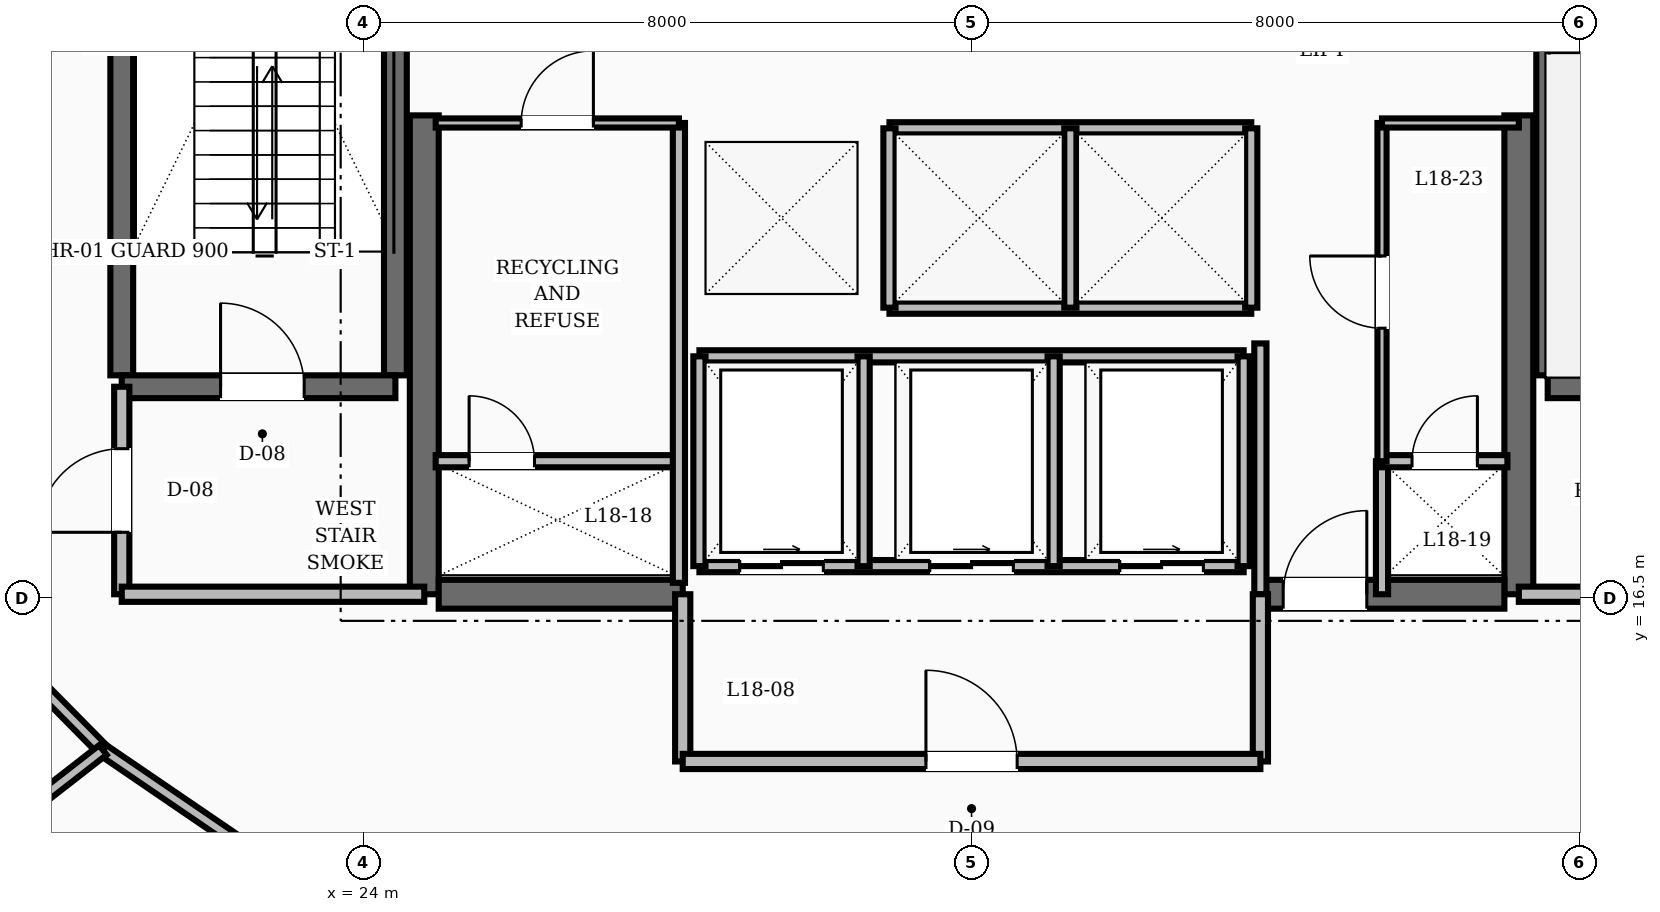
"""IFC4 building model, lengths in metres.
Left out: names, types, materials, properties, quantities, classifications, styles, units other than length and angle.
Written with IfcOpenShell. Run it as: python <this file> out.ifc"""

import sys

from ifc_helpers import new_model, si_unit, direction, frame, frame_2d, origin, place, context, subcontext, project, spatial, rectangle, extrude, element, fill, save


model = new_model("IFC4")
c1 = context("Model", 3, precision=1e-05, world=origin(), true_north=direction((0.0, 1.0)))
c2 = subcontext(c1, "Body", "Model", "MODEL_VIEW")
j1 = project(units=[si_unit("LENGTHUNIT", "METRE"), si_unit("PLANEANGLEUNIT", "RADIAN")], contexts=[c1])
p1 = place(None, origin())
s1 = spatial("IfcSite", under=j1, at=p1, CompositionType="ELEMENT")
p2 = place(p1, origin())
s2 = spatial("IfcBuilding", under=s1, at=p2, CompositionType="ELEMENT")
p3 = place(p2, frame((0.0, 0.0, 73.6)))
s3 = spatial("IfcBuildingStorey", under=s2, at=p3, CompositionType="ELEMENT", Elevation=73.6)
for number, where, z_axis, x_axis in (
    (1, (24.8, 16.55, 0.0), (0.0, 0.0, 1.0), (0.0, 1.0, 0.0)),
    (2, (39.2, 16.55, 0.0), (0.0, 0.0, 1.0), (0.0, 1.0, 0.0)),
):
    element("IfcWall", number, at=place(p3, frame(where, z_axis=z_axis, x_axis=x_axis)), inside=s3, PredefinedType="SHEAR", context=c2, shape_type="SweptSolid", body=[
        extrude(rectangle(XDim=6.3, YDim=0.38, at=frame_2d((3.15, 0.0))), origin(), (0.0, 0.0, 1.0), 3.6),
    ])
p4 = place(p3, frame((24.99, 16.55, 0.0), z_axis=(0.0, 0.0, 1.0), x_axis=(1.0, 0.0, 0.0)))
e3 = element("IfcWall", 3, at=p4, inside=s3, PredefinedType="SHEAR", context=c2, shape_type="SweptSolid", body=[
    extrude(rectangle(XDim=3.21, YDim=0.38, at=frame_2d((1.605, 0.0))), origin(), (0.0, 0.0, 1.0), 3.6),
])
p5 = place(p3, frame((35.8, 16.55, 0.0), z_axis=(0.0, 0.0, 1.0), x_axis=(1.0, 0.0, 0.0)))
e4 = element("IfcWall", 4, at=p5, inside=s3, PredefinedType="SHEAR", context=c2, shape_type="SweptSolid", body=[
    extrude(rectangle(XDim=3.21, YDim=0.38, at=frame_2d((1.605, 0.0))), origin(), (0.0, 0.0, 1.0), 3.6),
])
p6 = place(p5, frame((0.3, 0.0, 0.0)))
e5 = element("IfcOpeningElement", 5, at=p6, cuts=e4, PredefinedType="OPENING", context=c2, shape_type="SweptSolid", body=[
    extrude(rectangle(XDim=1.1, YDim=2.1, at=frame_2d((0.55, 1.05))), frame((0.0, 0.2, 0.0), z_axis=(0.0, -1.0, 0.0), x_axis=(1.0, 0.0, 0.0)), (0.0, 0.0, 1.0), 0.4),
])
for number, where, z_axis, x_axis in (
    (6, (20.82, 19.43, 0.0), (0.0, 0.0, 1.0), (0.0, 1.0, 0.0)),
    (7, (24.42, 19.43, 0.0), (0.0, 0.0, 1.0), (0.0, 1.0, 0.0)),
):
    element("IfcWall", number, at=place(p3, frame(where, z_axis=z_axis, x_axis=x_axis)), inside=s3, PredefinedType="SHEAR", context=c2, shape_type="SweptSolid", body=[
        extrude(rectangle(XDim=8.74, YDim=0.3, at=frame_2d((4.37, 0.0))), origin(), (0.0, 0.0, 1.0), 3.6),
    ])
p7 = place(p3, frame((20.82, 19.28, 0.0), z_axis=(0.0, 0.0, 1.0), x_axis=(1.0, 0.0, 0.0)))
e8 = element("IfcWall", 8, at=p7, inside=s3, PredefinedType="SHEAR", context=c2, shape_type="SweptSolid", body=[
    extrude(rectangle(XDim=3.6, YDim=0.3, at=frame_2d((1.8, 0.0))), origin(), (0.0, 0.0, 1.0), 3.6),
])
p8 = place(p7, frame((1.3, 0.0, 0.0)))
e9 = element("IfcOpeningElement", 9, at=p8, cuts=e8, PredefinedType="OPENING", context=c2, shape_type="SweptSolid", body=[
    extrude(rectangle(XDim=1.1, YDim=2.1, at=frame_2d((0.55, 1.05))), frame((0.0, 0.16, 0.0), z_axis=(0.0, -1.0, 0.0), x_axis=(1.0, 0.0, 0.0)), (0.0, 0.0, 1.0), 0.32),
])
p9 = place(p3, frame((39.58, 19.43, 0.0), z_axis=(0.0, 0.0, 1.0), x_axis=(0.0, 1.0, 0.0)))
e10 = element("IfcWall", 10, at=p9, inside=s3, PredefinedType="SHEAR", context=c2, shape_type="SweptSolid", body=[
    extrude(rectangle(XDim=8.74, YDim=0.3, at=frame_2d((4.37, 0.0))), origin(), (0.0, 0.0, 1.0), 3.6),
])
p10 = place(p3, frame((39.58, 19.28, 0.0), z_axis=(0.0, 0.0, 1.0), x_axis=(1.0, 0.0, 0.0)))
e11 = element("IfcWall", 11, at=p10, inside=s3, PredefinedType="SHEAR", context=c2, shape_type="SweptSolid", body=[
    extrude(rectangle(XDim=3.6, YDim=0.3, at=frame_2d((1.8, 0.0))), origin(), (0.0, 0.0, 1.0), 3.6),
])
p11 = place(p3, frame((20.82, 16.55, 0.0), z_axis=(0.0, 0.0, 1.0), x_axis=(0.0, 1.0, 0.0)))
e12 = element("IfcWall", 12, at=p11, inside=s3, PredefinedType="SOLIDWALL", context=c2, shape_type="SweptSolid", body=[
    extrude(rectangle(XDim=2.73, YDim=0.2, at=frame_2d((1.365, 0.0))), origin(), (0.0, 0.0, 1.0), 2.71),
])
p12 = place(p11, frame((0.815, 0.0, 0.0)))
e13 = element("IfcOpeningElement", 13, at=p12, cuts=e12, PredefinedType="OPENING", context=c2, shape_type="SweptSolid", body=[
    extrude(rectangle(XDim=1.1, YDim=2.1, at=frame_2d((0.55, 1.05))), frame((0.0, 0.11, 0.0), z_axis=(0.0, -1.0, 0.0), x_axis=(1.0, 0.0, 0.0)), (0.0, 0.0, 1.0), 0.22),
])
for number, where, z_axis, x_axis in (
    (14, (20.82, 16.55, 0.0), (0.0, 0.0, 1.0), (1.0, 0.0, 0.0)),
    (15, (39.2, 16.55, 0.0), (0.0, 0.0, 1.0), (1.0, 0.0, 0.0)),
):
    element("IfcWall", number, at=place(p3, frame(where, z_axis=z_axis, x_axis=x_axis)), inside=s3, PredefinedType="SOLIDWALL", context=c2, shape_type="SweptSolid", body=[
        extrude(rectangle(XDim=3.98, YDim=0.2, at=frame_2d((1.99, 0.0))), origin(), (0.0, 0.0, 1.0), 2.71),
    ])
p13 = place(p3, frame((35.8, 16.55, 0.0), z_axis=(0.0, 0.0, 1.0), x_axis=(0.0, 1.0, 0.0)))
e16 = element("IfcWall", 16, at=p13, inside=s3, PredefinedType="SOLIDWALL", context=c2, shape_type="SweptSolid", body=[
    extrude(rectangle(XDim=3.3, YDim=0.16, at=frame_2d((1.65, 0.0))), origin(), (0.0, 0.0, 1.0), 2.71),
])
p14 = place(p3, frame((37.4, 16.55, 0.0), z_axis=(0.0, 0.0, 1.0), x_axis=(0.0, 1.0, 0.0)))
e17 = element("IfcWall", 17, at=p14, inside=s3, PredefinedType="SOLIDWALL", context=c2, shape_type="SweptSolid", body=[
    extrude(rectangle(XDim=1.75, YDim=0.16, at=frame_2d((0.875, 0.0))), origin(), (0.0, 0.0, 1.0), 2.71),
])
for number, where, z_axis, x_axis in (
    (18, (28.2, 14.35, 0.0), (0.0, 0.0, 1.0), (0.0, 1.0, 0.0)),
    (19, (35.8, 14.35, 0.0), (0.0, 0.0, 1.0), (0.0, 1.0, 0.0)),
):
    element("IfcWall", number, at=place(p3, frame(where, z_axis=z_axis, x_axis=x_axis)), inside=s3, PredefinedType="SOLIDWALL", context=c2, shape_type="SweptSolid", body=[
        extrude(rectangle(XDim=2.2, YDim=0.2, at=frame_2d((1.1, 0.0))), origin(), (0.0, 0.0, 1.0), 2.71),
    ])
p15 = place(p3, frame((28.2, 14.35, 0.0), z_axis=(0.0, 0.0, 1.0), x_axis=(1.0, 0.0, 0.0)))
e20 = element("IfcWall", 20, at=p15, inside=s3, PredefinedType="SOLIDWALL", context=c2, shape_type="SweptSolid", body=[
    extrude(rectangle(XDim=7.6, YDim=0.2, at=frame_2d((3.8, 0.0))), origin(), (0.0, 0.0, 1.0), 2.71),
])
p16 = place(p15, frame((3.2, 0.0, 0.0)))
e21 = element("IfcOpeningElement", 21, at=p16, cuts=e20, PredefinedType="OPENING", context=c2, shape_type="SweptSolid", body=[
    extrude(rectangle(XDim=1.2, YDim=2.1, at=frame_2d((0.6, 1.05))), frame((0.0, 0.11, 0.0), z_axis=(0.0, -1.0, 0.0), x_axis=(1.0, 0.0, 0.0)), (0.0, 0.0, 1.0), 0.22),
])
for number, where, z_axis, x_axis in (
    (22, (30.92, 22.68, 0.0), (0.0, 0.0, 1.0), (1.0, 0.0, 0.0)),
    (23, (30.92, 20.32, 0.0), (0.0, 0.0, 1.0), (1.0, 0.0, 0.0)),
):
    element("IfcWall", number, at=place(p3, frame(where, z_axis=z_axis, x_axis=x_axis)), inside=s3, PredefinedType="SOLIDWALL", context=c2, shape_type="SweptSolid", body=[
        extrude(rectangle(XDim=4.76, YDim=0.16, at=frame_2d((2.38, 0.0))), origin(), (0.0, 0.0, 1.0), 2.71),
    ])
for number, where, z_axis, x_axis in (
    (24, (30.92, 20.32, 0.0), (0.0, 0.0, 1.0), (0.0, 1.0, 0.0)),
    (25, (33.3, 20.32, 0.0), (0.0, 0.0, 1.0), (0.0, 1.0, 0.0)),
    (26, (35.68, 20.32, 0.0), (0.0, 0.0, 1.0), (0.0, 1.0, 0.0)),
):
    element("IfcWall", number, at=place(p3, frame(where, z_axis=z_axis, x_axis=x_axis)), inside=s3, PredefinedType="SOLIDWALL", context=c2, shape_type="SweptSolid", body=[
        extrude(rectangle(XDim=2.36, YDim=0.16, at=frame_2d((1.18, 0.0))), origin(), (0.0, 0.0, 1.0), 2.71),
    ])
p17 = place(p3, frame((28.42, 16.92, 0.0), z_axis=(0.0, 0.0, 1.0), x_axis=(1.0, 0.0, 0.0)))
e27 = element("IfcWall", 27, at=p17, inside=s3, PredefinedType="SOLIDWALL", context=c2, shape_type="SweptSolid", body=[
    extrude(rectangle(XDim=7.16, YDim=0.16, at=frame_2d((3.58, 0.0))), origin(), (0.0, 0.0, 1.0), 2.71),
])
p18 = place(p17, frame((0.53, 0.0, 0.0)))
e28 = element("IfcOpeningElement", 28, at=p18, cuts=e27, PredefinedType="OPENING", context=c2, shape_type="SweptSolid", body=[
    extrude(rectangle(XDim=1.1, YDim=2.15, at=frame_2d((0.55, 1.075))), frame((0.0, 0.09, 0.0), z_axis=(0.0, -1.0, 0.0), x_axis=(1.0, 0.0, 0.0)), (0.0, 0.0, 1.0), 0.18),
])
p19 = place(p17, frame((3.03, 0.0, 0.0)))
e29 = element("IfcOpeningElement", 29, at=p19, cuts=e27, PredefinedType="OPENING", context=c2, shape_type="SweptSolid", body=[
    extrude(rectangle(XDim=1.1, YDim=2.15, at=frame_2d((0.55, 1.075))), frame((0.0, 0.09, 0.0), z_axis=(0.0, -1.0, 0.0), x_axis=(1.0, 0.0, 0.0)), (0.0, 0.0, 1.0), 0.18),
])
p20 = place(p17, frame((5.53, 0.0, 0.0)))
e30 = element("IfcOpeningElement", 30, at=p20, cuts=e27, PredefinedType="OPENING", context=c2, shape_type="SweptSolid", body=[
    extrude(rectangle(XDim=1.1, YDim=2.15, at=frame_2d((0.55, 1.075))), frame((0.0, 0.09, 0.0), z_axis=(0.0, -1.0, 0.0), x_axis=(1.0, 0.0, 0.0)), (0.0, 0.0, 1.0), 0.18),
])
p21 = place(p3, frame((28.42, 19.68, 0.0), z_axis=(0.0, 0.0, 1.0), x_axis=(1.0, 0.0, 0.0)))
e31 = element("IfcWall", 31, at=p21, inside=s3, PredefinedType="SOLIDWALL", context=c2, shape_type="SweptSolid", body=[
    extrude(rectangle(XDim=7.16, YDim=0.16, at=frame_2d((3.58, 0.0))), origin(), (0.0, 0.0, 1.0), 2.71),
])
for number, where, z_axis, x_axis in (
    (32, (28.42, 16.92, 0.0), (0.0, 0.0, 1.0), (0.0, 1.0, 0.0)),
    (33, (30.58, 16.92, 0.0), (0.0, 0.0, 1.0), (0.0, 1.0, 0.0)),
    (34, (33.08, 16.92, 0.0), (0.0, 0.0, 1.0), (0.0, 1.0, 0.0)),
    (35, (35.58, 16.92, 0.0), (0.0, 0.0, 1.0), (0.0, 1.0, 0.0)),
):
    element("IfcWall", number, at=place(p3, frame(where, z_axis=z_axis, x_axis=x_axis)), inside=s3, PredefinedType="SOLIDWALL", context=c2, shape_type="SweptSolid", body=[
        extrude(rectangle(XDim=2.76, YDim=0.16, at=frame_2d((1.38, 0.0))), origin(), (0.0, 0.0, 1.0), 2.71),
    ])
p22 = place(p3, frame((24.95, 18.3, 0.0), z_axis=(0.0, 0.0, 1.0), x_axis=(1.0, 0.0, 0.0)))
e36 = element("IfcWall", 36, at=p22, inside=s3, PredefinedType="SOLIDWALL", context=c2, shape_type="SweptSolid", body=[
    extrude(rectangle(XDim=3.2, YDim=0.16, at=frame_2d((1.6, 0.0))), origin(), (0.0, 0.0, 1.0), 2.71),
])
p23 = place(p22, frame((0.44, 0.0, 0.0)))
e37 = element("IfcOpeningElement", 37, at=p23, cuts=e36, PredefinedType="OPENING", context=c2, shape_type="SweptSolid", body=[
    extrude(rectangle(XDim=0.86, YDim=2.05, at=frame_2d((0.43, 1.025))), frame((0.0, 0.09, 0.0), z_axis=(0.0, -1.0, 0.0), x_axis=(1.0, 0.0, 0.0)), (0.0, 0.0, 1.0), 0.18),
])
p24 = place(p3, frame((28.15, 16.7, 0.0), z_axis=(0.0, 0.0, 1.0), x_axis=(0.0, 1.0, 0.0)))
e38 = element("IfcWall", 38, at=p24, inside=s3, PredefinedType="SOLIDWALL", context=c2, shape_type="SweptSolid", body=[
    extrude(rectangle(XDim=6.05, YDim=0.16, at=frame_2d((3.025, 0.0))), origin(), (0.0, 0.0, 1.0), 2.71),
])
p25 = place(p3, frame((37.4, 18.3, 0.0), z_axis=(0.0, 0.0, 1.0), x_axis=(1.0, 0.0, 0.0)))
e39 = element("IfcWall", 39, at=p25, inside=s3, PredefinedType="SOLIDWALL", context=c2, shape_type="SweptSolid", body=[
    extrude(rectangle(XDim=1.65, YDim=0.16, at=frame_2d((0.825, 0.0))), origin(), (0.0, 0.0, 1.0), 2.71),
])
p26 = place(p25, frame((0.395, 0.0, 0.0)))
e40 = element("IfcOpeningElement", 40, at=p26, cuts=e39, PredefinedType="OPENING", context=c2, shape_type="SweptSolid", body=[
    extrude(rectangle(XDim=0.86, YDim=2.1, at=frame_2d((0.43, 1.05))), frame((0.0, 0.09, 0.0), z_axis=(0.0, -1.0, 0.0), x_axis=(1.0, 0.0, 0.0)), (0.0, 0.0, 1.0), 0.18),
])
p27 = place(p3, frame((24.95, 22.75, 0.0), z_axis=(0.0, 0.0, 1.0), x_axis=(1.0, 0.0, 0.0)))
e41 = element("IfcWall", 41, at=p27, inside=s3, PredefinedType="PARTITIONING", context=c2, shape_type="SweptSolid", body=[
    extrude(rectangle(XDim=3.2, YDim=0.12, at=frame_2d((1.6, 0.0))), origin(), (0.0, 0.0, 1.0), 2.71),
])
p28 = place(p27, frame((1.125, 0.0, 0.0)))
e42 = element("IfcOpeningElement", 42, at=p28, cuts=e41, PredefinedType="OPENING", context=c2, shape_type="SweptSolid", body=[
    extrude(rectangle(XDim=0.95, YDim=2.1, at=frame_2d((0.475, 1.05))), frame((0.0, 0.07, 0.0), z_axis=(0.0, -1.0, 0.0), x_axis=(1.0, 0.0, 0.0)), (0.0, 0.0, 1.0), 0.14),
])
p29 = place(p3, frame((37.4, 18.3, 0.0), z_axis=(0.0, 0.0, 1.0), x_axis=(0.0, 1.0, 0.0)))
e43 = element("IfcWall", 43, at=p29, inside=s3, PredefinedType="PARTITIONING", context=c2, shape_type="SweptSolid", body=[
    extrude(rectangle(XDim=4.45, YDim=0.12, at=frame_2d((2.225, 0.0))), origin(), (0.0, 0.0, 1.0), 2.71),
])
p30 = place(p29, frame((1.75, 0.0, 0.0)))
e44 = element("IfcOpeningElement", 44, at=p30, cuts=e43, PredefinedType="OPENING", context=c2, shape_type="SweptSolid", body=[
    extrude(rectangle(XDim=0.95, YDim=2.1, at=frame_2d((0.475, 1.05))), frame((0.0, 0.07, 0.0), z_axis=(0.0, -1.0, 0.0), x_axis=(1.0, 0.0, 0.0)), (0.0, 0.0, 1.0), 0.14),
])
p31 = place(p3, frame((37.4, 22.75, 0.0), z_axis=(0.0, 0.0, 1.0), x_axis=(1.0, 0.0, 0.0)))
e45 = element("IfcWall", 45, at=p31, inside=s3, PredefinedType="PARTITIONING", context=c2, shape_type="SweptSolid", body=[
    extrude(rectangle(XDim=1.8, YDim=0.12, at=frame_2d((0.9, 0.0))), origin(), (0.0, 0.0, 1.0), 2.71),
])
p32 = place(p3, frame((18.562, 16.537, 0.0), z_axis=(0.0, 0.0, 1.0), x_axis=(0.702569520063, -0.711615113301, 0.0)))
e46 = element("IfcWall", 46, at=p32, inside=s3, PredefinedType="SOLIDWALL", context=c2, shape_type="SweptSolid", body=[
    extrude(rectangle(XDim=2.861, YDim=0.16, at=frame_2d((1.43, 0.0))), origin(), (0.0, 0.0, 1.0), 2.71),
])
p33 = place(p3, frame((20.572, 14.501, 0.0), z_axis=(0.0, 0.0, 1.0), x_axis=(0.826112340767, -0.563505457323, 0.0)))
e47 = element("IfcWall", 47, at=p33, inside=s3, PredefinedType="SOLIDWALL", context=c2, shape_type="SweptSolid", body=[
    extrude(rectangle(XDim=2.965, YDim=0.16, at=frame_2d((1.482, 0.0))), origin(), (0.0, 0.0, 1.0), 2.71),
])
p34 = place(p3, frame((20.572, 14.501, 0.0), z_axis=(0.0, 0.0, 1.0), x_axis=(-0.788888678139, -0.614536128722, 0.0)))
e48 = element("IfcWall", 48, at=p34, inside=s3, PredefinedType="SOLIDWALL", context=c2, shape_type="SweptSolid", body=[
    extrude(rectangle(XDim=9.165, YDim=0.16, at=frame_2d((4.583, 0.0))), origin(), (0.0, 0.0, 1.0), 2.71),
])
p35 = place(p8, origin())
e49 = element("IfcDoor", 49, at=p35, inside=s3, OperationType="SINGLE_SWING_LEFT", PredefinedType="DOOR", context=c2, shape_type="SweptSolid", body=[
    extrude(rectangle(XDim=1.1, YDim=2.1, at=frame_2d((0.55, 1.05))), frame((0.0, 0.025, 0.0), z_axis=(0.0, -1.0, 0.0), x_axis=(1.0, 0.0, 0.0)), (0.0, 0.0, 1.0), 0.05),
])
fill(e9, e49)
p36 = place(p12, origin())
e50 = element("IfcDoor", 50, at=p36, inside=s3, OperationType="SINGLE_SWING_LEFT", PredefinedType="DOOR", context=c2, shape_type="SweptSolid", body=[
    extrude(rectangle(XDim=1.1, YDim=2.1, at=frame_2d((0.55, 1.05))), frame((0.0, 0.025, 0.0), z_axis=(0.0, -1.0, 0.0), x_axis=(1.0, 0.0, 0.0)), (0.0, 0.0, 1.0), 0.05),
])
fill(e13, e50)
p37 = place(p6, origin())
e51 = element("IfcDoor", 51, at=p37, inside=s3, OperationType="SINGLE_SWING_RIGHT", PredefinedType="DOOR", context=c2, shape_type="SweptSolid", body=[
    extrude(rectangle(XDim=1.1, YDim=2.1, at=frame_2d((0.55, 1.05))), frame((0.0, 0.025, 0.0), z_axis=(0.0, -1.0, 0.0), x_axis=(1.0, 0.0, 0.0)), (0.0, 0.0, 1.0), 0.05),
])
fill(e5, e51)
p38 = place(p16, origin())
e52 = element("IfcDoor", 52, at=p38, inside=s3, OperationType="SINGLE_SWING_LEFT", PredefinedType="DOOR", context=c2, shape_type="SweptSolid", body=[
    extrude(rectangle(XDim=1.2, YDim=2.1, at=frame_2d((0.6, 1.05))), frame((0.0, 0.025, 0.0), z_axis=(0.0, -1.0, 0.0), x_axis=(1.0, 0.0, 0.0)), (0.0, 0.0, 1.0), 0.05),
])
fill(e21, e52)
p39 = place(p18, origin())
e53 = element("IfcDoor", 53, at=p39, inside=s3, OperationType="SLIDING_TO_RIGHT", PredefinedType="DOOR", context=c2, shape_type="SweptSolid", body=[
    extrude(rectangle(XDim=1.1, YDim=2.15, at=frame_2d((0.55, 1.075))), frame((0.0, 0.025, 0.0), z_axis=(0.0, -1.0, 0.0), x_axis=(1.0, 0.0, 0.0)), (0.0, 0.0, 1.0), 0.05),
])
fill(e28, e53)
p40 = place(p19, origin())
e54 = element("IfcDoor", 54, at=p40, inside=s3, OperationType="SLIDING_TO_RIGHT", PredefinedType="DOOR", context=c2, shape_type="SweptSolid", body=[
    extrude(rectangle(XDim=1.1, YDim=2.15, at=frame_2d((0.55, 1.075))), frame((0.0, 0.025, 0.0), z_axis=(0.0, -1.0, 0.0), x_axis=(1.0, 0.0, 0.0)), (0.0, 0.0, 1.0), 0.05),
])
fill(e29, e54)
p41 = place(p20, origin())
e55 = element("IfcDoor", 55, at=p41, inside=s3, OperationType="SLIDING_TO_RIGHT", PredefinedType="DOOR", context=c2, shape_type="SweptSolid", body=[
    extrude(rectangle(XDim=1.1, YDim=2.15, at=frame_2d((0.55, 1.075))), frame((0.0, 0.025, 0.0), z_axis=(0.0, -1.0, 0.0), x_axis=(1.0, 0.0, 0.0)), (0.0, 0.0, 1.0), 0.05),
])
fill(e30, e55)
p42 = place(p23, origin())
e56 = element("IfcDoor", 56, at=p42, inside=s3, OperationType="SINGLE_SWING_LEFT", PredefinedType="TRAPDOOR", context=c2, shape_type="SweptSolid", body=[
    extrude(rectangle(XDim=0.86, YDim=2.05, at=frame_2d((0.43, 1.025))), frame((0.0, 0.025, 0.0), z_axis=(0.0, -1.0, 0.0), x_axis=(1.0, 0.0, 0.0)), (0.0, 0.0, 1.0), 0.05),
])
fill(e37, e56)
p43 = place(p26, origin())
e57 = element("IfcDoor", 57, at=p43, inside=s3, OperationType="SINGLE_SWING_RIGHT", PredefinedType="TRAPDOOR", context=c2, shape_type="SweptSolid", body=[
    extrude(rectangle(XDim=0.86, YDim=2.1, at=frame_2d((0.43, 1.05))), frame((0.0, 0.025, 0.0), z_axis=(0.0, -1.0, 0.0), x_axis=(1.0, 0.0, 0.0)), (0.0, 0.0, 1.0), 0.05),
])
fill(e40, e57)
p44 = place(p28, origin())
e58 = element("IfcDoor", 58, at=p44, inside=s3, OperationType="SINGLE_SWING_RIGHT", PredefinedType="DOOR", context=c2, shape_type="SweptSolid", body=[
    extrude(rectangle(XDim=0.95, YDim=2.1, at=frame_2d((0.475, 1.05))), frame((0.0, 0.025, 0.0), z_axis=(0.0, -1.0, 0.0), x_axis=(1.0, 0.0, 0.0)), (0.0, 0.0, 1.0), 0.05),
])
fill(e42, e58)
p45 = place(p30, origin())
e59 = element("IfcDoor", 59, at=p45, inside=s3, OperationType="SINGLE_SWING_RIGHT", PredefinedType="DOOR", context=c2, shape_type="SweptSolid", body=[
    extrude(rectangle(XDim=0.95, YDim=2.1, at=frame_2d((0.475, 1.05))), frame((0.0, 0.025, 0.0), z_axis=(0.0, -1.0, 0.0), x_axis=(1.0, 0.0, 0.0)), (0.0, 0.0, 1.0), 0.05),
])
fill(e44, e59)
save(model, sys.argv[1])
